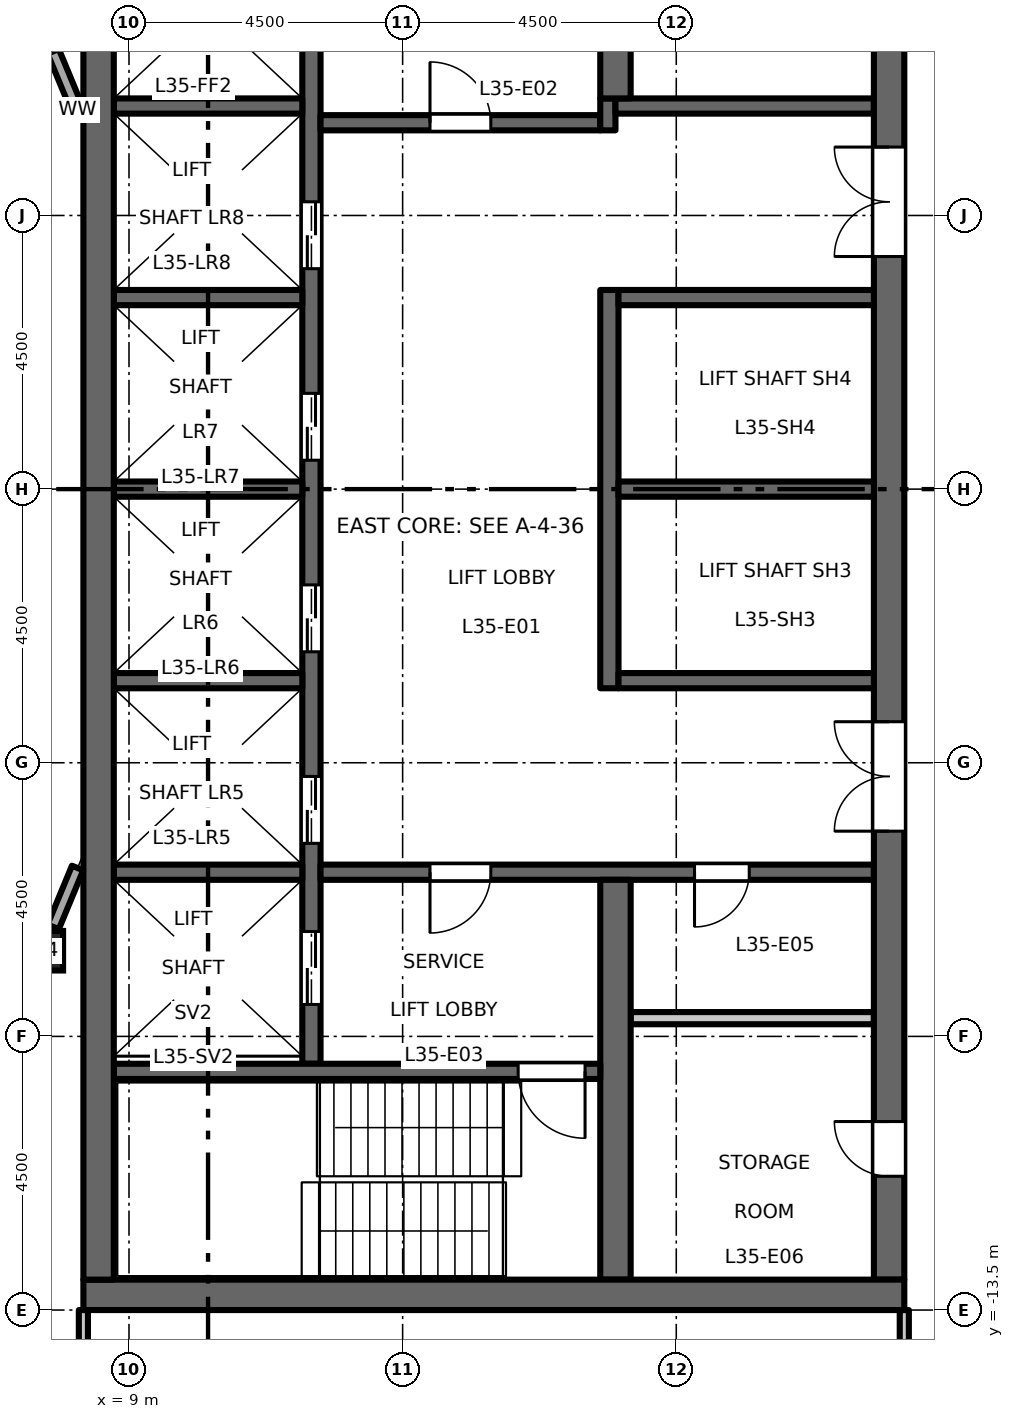
"""IFC4 building model, lengths in metres.
Left out: names, types, materials, properties, quantities, classifications, styles, units other than length and angle.
Written with IfcOpenShell. Run it as: python <this file> out.ifc"""

import sys

from ifc_helpers import new_model, si_unit, direction, frame, frame_2d, origin, origin_2d, place, context, subcontext, project, spatial, rectangle, hollow_rectangle, extrude, element, fill, save


model = new_model("IFC4")
c1 = context("Model", 3, precision=1e-05, world=origin(), true_north=direction((0.0, 1.0)))
c2 = subcontext(c1, "Body", "Model", "MODEL_VIEW")
j1 = project(units=[si_unit("LENGTHUNIT", "METRE"), si_unit("PLANEANGLEUNIT", "RADIAN")], contexts=[c1])
p1 = place(None, origin())
s1 = spatial("IfcSite", under=j1, at=p1, CompositionType="ELEMENT")
p2 = place(p1, origin())
s2 = spatial("IfcBuilding", under=s1, at=p2, CompositionType="ELEMENT")
p3 = place(p2, frame((0.0, 0.0, 163.2)))
s3 = spatial("IfcBuildingStorey", under=s2, at=p3, CompositionType="ELEMENT", Elevation=163.2)
p4 = place(p3, frame((7.591, -7.591, 0.0), z_axis=(0.0, 0.0, 1.0), x_axis=(1.0, 0.0, 0.0)))
e1 = element("IfcColumn", 1, at=p4, inside=s3, PredefinedType="COLUMN", context=c2, shape_type="SweptSolid", body=[
    extrude(hollow_rectangle(XDim=0.65, YDim=0.65, WallThickness=0.036, at=origin_2d()), origin(), (0.0, 0.0, 1.0), 4.5),
])
p5 = place(p3, frame((12.0, -9.45, 0.0), z_axis=(0.0, 0.0, 1.0), x_axis=(0.0, 1.0, 0.0)))
e2 = element("IfcWall", 2, at=p5, inside=s3, PredefinedType="SHEAR", context=c2, shape_type="SweptSolid", body=[
    extrude(rectangle(XDim=18.9, YDim=0.3, at=frame_2d((9.45, 0.0))), origin(), (0.0, 0.0, 1.0), 4.35),
])
p6 = place(p5, frame((3.625, 0.0, 0.0)))
e3 = element("IfcOpeningElement", 3, at=p6, cuts=e2, PredefinedType="OPENING", context=c2, shape_type="SweptSolid", body=[
    extrude(rectangle(XDim=1.1, YDim=2.1, at=frame_2d((0.55, 1.05))), frame((0.0, 0.16, 0.0), z_axis=(0.0, -1.0, 0.0), x_axis=(1.0, 0.0, 0.0)), (0.0, 0.0, 1.0), 0.32),
])
p7 = place(p5, frame((6.775, 0.0, 0.0)))
e4 = element("IfcOpeningElement", 4, at=p7, cuts=e2, PredefinedType="OPENING", context=c2, shape_type="SweptSolid", body=[
    extrude(rectangle(XDim=1.1, YDim=2.1, at=frame_2d((0.55, 1.05))), frame((0.0, 0.16, 0.0), z_axis=(0.0, -1.0, 0.0), x_axis=(1.0, 0.0, 0.0)), (0.0, 0.0, 1.0), 0.32),
])
p8 = place(p5, frame((9.925, 0.0, 0.0)))
e5 = element("IfcOpeningElement", 5, at=p8, cuts=e2, PredefinedType="OPENING", context=c2, shape_type="SweptSolid", body=[
    extrude(rectangle(XDim=1.1, YDim=2.1, at=frame_2d((0.55, 1.05))), frame((0.0, 0.16, 0.0), z_axis=(0.0, -1.0, 0.0), x_axis=(1.0, 0.0, 0.0)), (0.0, 0.0, 1.0), 0.32),
])
p9 = place(p5, frame((13.075, 0.0, 0.0)))
e6 = element("IfcOpeningElement", 6, at=p9, cuts=e2, PredefinedType="OPENING", context=c2, shape_type="SweptSolid", body=[
    extrude(rectangle(XDim=1.1, YDim=2.1, at=frame_2d((0.55, 1.05))), frame((0.0, 0.16, 0.0), z_axis=(0.0, -1.0, 0.0), x_axis=(1.0, 0.0, 0.0)), (0.0, 0.0, 1.0), 0.32),
])
p10 = place(p5, frame((16.725, 0.0, 0.0)))
e7 = element("IfcOpeningElement", 7, at=p10, cuts=e2, PredefinedType="OPENING", context=c2, shape_type="SweptSolid", body=[
    extrude(rectangle(XDim=1.2, YDim=2.1, at=frame_2d((0.6, 1.05))), frame((0.0, 0.16, 0.0), z_axis=(0.0, -1.0, 0.0), x_axis=(1.0, 0.0, 0.0)), (0.0, 0.0, 1.0), 0.32),
])
p11 = place(p5, frame((0.975, 0.0, 0.0)))
e8 = element("IfcOpeningElement", 8, at=p11, cuts=e2, PredefinedType="OPENING", context=c2, shape_type="SweptSolid", body=[
    extrude(rectangle(XDim=1.2, YDim=2.1, at=frame_2d((0.6, 1.05))), frame((0.0, 0.16, 0.0), z_axis=(0.0, -1.0, 0.0), x_axis=(1.0, 0.0, 0.0)), (0.0, 0.0, 1.0), 0.32),
])
p12 = place(p3, frame((12.15, 6.025, 0.0), z_axis=(0.0, 0.0, 1.0), x_axis=(1.0, 0.0, 0.0)))
e9 = element("IfcWall", 9, at=p12, inside=s3, PredefinedType="SHEAR", context=c2, shape_type="SweptSolid", body=[
    extrude(rectangle(XDim=4.6, YDim=0.25, at=frame_2d((2.3, 0.0))), origin(), (0.0, 0.0, 1.0), 4.35),
])
p13 = place(p12, frame((1.8, 0.0, 0.0)))
e10 = element("IfcOpeningElement", 10, at=p13, cuts=e9, PredefinedType="OPENING", context=c2, shape_type="SweptSolid", body=[
    extrude(rectangle(XDim=1.0, YDim=2.1, at=frame_2d((0.5, 1.05))), frame((0.0, 0.135, 0.0), z_axis=(0.0, -1.0, 0.0), x_axis=(1.0, 0.0, 0.0)), (0.0, 0.0, 1.0), 0.27),
])
p14 = place(p3, frame((16.875, 5.9, 0.0), z_axis=(0.0, 0.0, 1.0), x_axis=(0.0, 1.0, 0.0)))
e11 = element("IfcWall", 11, at=p14, inside=s3, PredefinedType="SHEAR", context=c2, shape_type="SweptSolid", body=[
    extrude(rectangle(XDim=0.525, YDim=0.25, at=frame_2d((0.263, 0.0))), origin(), (0.0, 0.0, 1.0), 4.35),
])
p15 = place(p3, frame((17.0, 6.3, 0.0), z_axis=(0.0, 0.0, 1.0), x_axis=(1.0, 0.0, 0.0)))
e12 = element("IfcWall", 12, at=p15, inside=s3, PredefinedType="SHEAR", context=c2, shape_type="SweptSolid", body=[
    extrude(rectangle(XDim=4.25, YDim=0.25, at=frame_2d((2.125, 0.0))), origin(), (0.0, 0.0, 1.0), 4.35),
])
p16 = place(p3, frame((12.15, -6.3, 0.0), z_axis=(0.0, 0.0, 1.0), x_axis=(1.0, 0.0, 0.0)))
e13 = element("IfcWall", 13, at=p16, inside=s3, PredefinedType="SHEAR", context=c2, shape_type="SweptSolid", body=[
    extrude(rectangle(XDim=9.1, YDim=0.25, at=frame_2d((4.55, 0.0))), origin(), (0.0, 0.0, 1.0), 4.35),
])
p17 = place(p16, frame((1.8, 0.0, 0.0)))
e14 = element("IfcOpeningElement", 14, at=p17, cuts=e13, PredefinedType="OPENING", context=c2, shape_type="SweptSolid", body=[
    extrude(rectangle(XDim=1.0, YDim=2.1, at=frame_2d((0.5, 1.05))), frame((0.0, 0.135, 0.0), z_axis=(0.0, -1.0, 0.0), x_axis=(1.0, 0.0, 0.0)), (0.0, 0.0, 1.0), 0.27),
])
p18 = place(p16, frame((6.15, 0.0, 0.0)))
e15 = element("IfcOpeningElement", 15, at=p18, cuts=e13, PredefinedType="OPENING", context=c2, shape_type="SweptSolid", body=[
    extrude(rectangle(XDim=0.9, YDim=2.1, at=frame_2d((0.45, 1.05))), frame((0.0, 0.135, 0.0), z_axis=(0.0, -1.0, 0.0), x_axis=(1.0, 0.0, 0.0)), (0.0, 0.0, 1.0), 0.27),
])
p19 = place(p3, frame((21.5, -13.0, 0.0), z_axis=(0.0, 0.0, 1.0), x_axis=(0.0, 1.0, 0.0)))
e16 = element("IfcWall", 16, at=p19, inside=s3, PredefinedType="SHEAR", context=c2, shape_type="SweptSolid", body=[
    extrude(rectangle(XDim=26.0, YDim=0.5, at=frame_2d((13.0, 0.0))), origin(), (0.0, 0.0, 1.0), 4.35),
])
p20 = place(p19, frame((16.825, 0.0, 0.0)))
e17 = element("IfcOpeningElement", 17, at=p20, cuts=e16, PredefinedType="OPENING", context=c2, shape_type="SweptSolid", body=[
    extrude(rectangle(XDim=1.8, YDim=2.1, at=frame_2d((0.9, 1.05))), frame((0.0, 0.26, 0.0), z_axis=(0.0, -1.0, 0.0), x_axis=(1.0, 0.0, 0.0)), (0.0, 0.0, 1.0), 0.52),
])
p21 = place(p19, frame((7.375, 0.0, 0.0)))
e18 = element("IfcOpeningElement", 18, at=p21, cuts=e16, PredefinedType="OPENING", context=c2, shape_type="SweptSolid", body=[
    extrude(rectangle(XDim=1.8, YDim=2.1, at=frame_2d((0.9, 1.05))), frame((0.0, 0.26, 0.0), z_axis=(0.0, -1.0, 0.0), x_axis=(1.0, 0.0, 0.0)), (0.0, 0.0, 1.0), 0.52),
])
p22 = place(p19, frame((22.45, 0.0, 0.0)))
e19 = element("IfcOpeningElement", 19, at=p22, cuts=e16, PredefinedType="OPENING", context=c2, shape_type="SweptSolid", body=[
    extrude(rectangle(XDim=0.9, YDim=2.1, at=frame_2d((0.45, 1.05))), frame((0.0, 0.26, 0.0), z_axis=(0.0, -1.0, 0.0), x_axis=(1.0, 0.0, 0.0)), (0.0, 0.0, 1.0), 0.52),
])
p23 = place(p19, frame((1.7, 0.0, 0.0)))
e20 = element("IfcOpeningElement", 20, at=p23, cuts=e16, PredefinedType="OPENING", context=c2, shape_type="SweptSolid", body=[
    extrude(rectangle(XDim=0.9, YDim=2.1, at=frame_2d((0.45, 1.05))), frame((0.0, 0.26, 0.0), z_axis=(0.0, -1.0, 0.0), x_axis=(1.0, 0.0, 0.0)), (0.0, 0.0, 1.0), 0.52),
])
p24 = place(p3, frame((17.25, -8.7, 0.0), z_axis=(0.0, 0.0, 1.0), x_axis=(1.0, 0.0, 0.0)))
e21 = element("IfcWall", 21, at=p24, inside=s3, PredefinedType="PARTITIONING", context=c2, shape_type="SweptSolid", body=[
    extrude(rectangle(XDim=4.0, YDim=0.2, at=frame_2d((2.0, 0.0))), origin(), (0.0, 0.0, 1.0), 4.35),
])
p25 = place(p3, frame((16.9, -3.275, 0.0), z_axis=(0.0, 0.0, 1.0), x_axis=(0.0, 1.0, 0.0)))
e22 = element("IfcWall", 22, at=p25, inside=s3, PredefinedType="SHEAR", context=c2, shape_type="SweptSolid", body=[
    extrude(rectangle(XDim=6.55, YDim=0.3, at=frame_2d((3.275, 0.0))), origin(), (0.0, 0.0, 1.0), 4.35),
])
for number, where, z_axis, x_axis in (
    (23, (17.05, 0.0, 0.0), (0.0, 0.0, 1.0), (1.0, 0.0, 0.0)),
    (24, (17.05, 3.15, 0.0), (0.0, 0.0, 1.0), (1.0, 0.0, 0.0)),
    (25, (17.05, -3.15, 0.0), (0.0, 0.0, 1.0), (1.0, 0.0, 0.0)),
):
    element("IfcWall", number, at=place(p3, frame(where, z_axis=z_axis, x_axis=x_axis)), inside=s3, PredefinedType="SHEAR", context=c2, shape_type="SweptSolid", body=[
        extrude(rectangle(XDim=4.2, YDim=0.25, at=frame_2d((2.1, 0.0))), origin(), (0.0, 0.0, 1.0), 4.35),
    ])
for number, where, z_axis, x_axis in (
    (26, (17.0, 6.425, 0.0), (0.0, 0.0, 1.0), (0.0, 1.0, 0.0)),
    (27, (17.0, -13.0, 0.0), (0.0, 0.0, 1.0), (0.0, 1.0, 0.0)),
):
    element("IfcWall", number, at=place(p3, frame(where, z_axis=z_axis, x_axis=x_axis)), inside=s3, PredefinedType="SHEAR", context=c2, shape_type="SweptSolid", body=[
        extrude(rectangle(XDim=6.575, YDim=0.5, at=frame_2d((3.288, 0.0))), origin(), (0.0, 0.0, 1.0), 4.35),
    ])
for number, where, z_axis, x_axis in (
    (28, (8.75, 0.0, 0.0), (0.0, 0.0, 1.0), (1.0, 0.0, 0.0)),
    (29, (8.75, 3.15, 0.0), (0.0, 0.0, 1.0), (1.0, 0.0, 0.0)),
    (30, (8.75, 6.3, 0.0), (0.0, 0.0, 1.0), (1.0, 0.0, 0.0)),
    (31, (8.75, -3.15, 0.0), (0.0, 0.0, 1.0), (1.0, 0.0, 0.0)),
    (32, (8.75, -6.3, 0.0), (0.0, 0.0, 1.0), (1.0, 0.0, 0.0)),
):
    element("IfcWall", number, at=place(p3, frame(where, z_axis=z_axis, x_axis=x_axis)), inside=s3, PredefinedType="SHEAR", context=c2, shape_type="SweptSolid", body=[
        extrude(rectangle(XDim=3.1, YDim=0.25, at=frame_2d((1.55, 0.0))), origin(), (0.0, 0.0, 1.0), 4.35),
    ])
p26 = place(p3, frame((8.75, -9.575, 0.0), z_axis=(0.0, 0.0, 1.0), x_axis=(1.0, 0.0, 0.0)))
e33 = element("IfcWall", 33, at=p26, inside=s3, PredefinedType="SHEAR", context=c2, shape_type="SweptSolid", body=[
    extrude(rectangle(XDim=8.0, YDim=0.25, at=frame_2d((4.0, 0.0))), origin(), (0.0, 0.0, 1.0), 4.35),
])
p27 = place(p26, frame((6.65, 0.0, 0.0)))
e34 = element("IfcOpeningElement", 34, at=p27, cuts=e33, PredefinedType="OPENING", context=c2, shape_type="SweptSolid", body=[
    extrude(rectangle(XDim=1.1, YDim=2.1, at=frame_2d((0.55, 1.05))), frame((0.0, 0.135, 0.0), z_axis=(0.0, -1.0, 0.0), x_axis=(1.0, 0.0, 0.0)), (0.0, 0.0, 1.0), 0.27),
])
p28 = place(p3, frame((8.25, -13.25, 0.0), z_axis=(0.0, 0.0, 1.0), x_axis=(1.0, 0.0, 0.0)))
e35 = element("IfcWall", 35, at=p28, inside=s3, PredefinedType="SHEAR", context=c2, shape_type="SweptSolid", body=[
    extrude(rectangle(XDim=13.5, YDim=0.5, at=frame_2d((6.75, 0.0))), origin(), (0.0, 0.0, 1.0), 4.35),
])
p29 = place(p3, frame((8.5, -13.0, 0.0), z_axis=(0.0, 0.0, 1.0), x_axis=(0.0, 1.0, 0.0)))
e36 = element("IfcWall", 36, at=p29, inside=s3, PredefinedType="SHEAR", context=c2, shape_type="SweptSolid", body=[
    extrude(rectangle(XDim=26.0, YDim=0.5, at=frame_2d((13.0, 0.0))), origin(), (0.0, 0.0, 1.0), 4.35),
])
for number, where, z_axis, x_axis in (
    (37, (7.753, -7.199, 0.0), (0.0, 0.0, 1.0), (0.383, 0.924, 0.0)),
    (38, (8.154, 6.231, 0.0), (0.0, 0.0, 1.0), (-0.383, 0.924, 0.0)),
):
    element("IfcWall", number, at=place(p3, frame(where, z_axis=z_axis, x_axis=x_axis)), inside=s3, PredefinedType="STANDARD", context=c2, shape_type="SweptSolid", body=[
        extrude(rectangle(XDim=1.048, YDim=0.2, at=frame_2d((0.524, 0.0))), origin(), (0.0, 0.0, 1.0), 3.826),
    ])
p30 = place(p3, frame((8.25, -15.8, 0.0), z_axis=(0.0, 0.0, 1.0), x_axis=(0.0, 1.0, 0.0)))
e39 = element("IfcWall", 39, at=p30, inside=s3, PredefinedType="PARTITIONING", context=c2, shape_type="SweptSolid", body=[
    extrude(rectangle(XDim=2.3, YDim=0.15, at=frame_2d((1.15, 0.0))), origin(), (0.0, 0.0, 1.0), 4.35),
])
p31 = place(p3, frame((21.75, -17.925, 0.0), z_axis=(0.0, 0.0, 1.0), x_axis=(0.0, 1.0, 0.0)))
e40 = element("IfcWall", 40, at=p31, inside=s3, PredefinedType="PARTITIONING", context=c2, shape_type="SweptSolid", body=[
    extrude(rectangle(XDim=4.425, YDim=0.15, at=frame_2d((2.212, 0.0))), origin(), (0.0, 0.0, 1.0), 4.35),
])
p32 = place(p13, origin())
e41 = element("IfcDoor", 41, at=p32, inside=s3, OperationType="SINGLE_SWING_RIGHT", PredefinedType="DOOR", context=c2, shape_type="SweptSolid", body=[
    extrude(rectangle(XDim=1.0, YDim=2.1, at=frame_2d((0.5, 1.05))), frame((0.0, 0.025, 0.0), z_axis=(0.0, -1.0, 0.0), x_axis=(1.0, 0.0, 0.0)), (0.0, 0.0, 1.0), 0.05),
])
fill(e10, e41)
p33 = place(p17, origin())
e42 = element("IfcDoor", 42, at=p33, inside=s3, OperationType="SINGLE_SWING_LEFT", PredefinedType="DOOR", context=c2, shape_type="SweptSolid", body=[
    extrude(rectangle(XDim=1.0, YDim=2.1, at=frame_2d((0.5, 1.05))), frame((0.0, 0.025, 0.0), z_axis=(0.0, -1.0, 0.0), x_axis=(1.0, 0.0, 0.0)), (0.0, 0.0, 1.0), 0.05),
])
fill(e14, e42)
p34 = place(p27, origin())
e43 = element("IfcDoor", 43, at=p34, inside=s3, OperationType="SINGLE_SWING_RIGHT", PredefinedType="DOOR", context=c2, shape_type="SweptSolid", body=[
    extrude(rectangle(XDim=1.1, YDim=2.1, at=frame_2d((0.55, 1.05))), frame((0.0, 0.025, 0.0), z_axis=(0.0, -1.0, 0.0), x_axis=(1.0, 0.0, 0.0)), (0.0, 0.0, 1.0), 0.05),
])
fill(e34, e43)
p35 = place(p20, origin())
e44 = element("IfcDoor", 44, at=p35, inside=s3, OperationType="DOUBLE_DOOR_DOUBLE_SWING", PredefinedType="DOOR", context=c2, shape_type="SweptSolid", body=[
    extrude(rectangle(XDim=1.8, YDim=2.1, at=frame_2d((0.9, 1.05))), frame((0.0, 0.025, 0.0), z_axis=(0.0, -1.0, 0.0), x_axis=(1.0, 0.0, 0.0)), (0.0, 0.0, 1.0), 0.05),
])
fill(e17, e44)
p36 = place(p21, origin())
e45 = element("IfcDoor", 45, at=p36, inside=s3, OperationType="DOUBLE_DOOR_DOUBLE_SWING", PredefinedType="DOOR", context=c2, shape_type="SweptSolid", body=[
    extrude(rectangle(XDim=1.8, YDim=2.1, at=frame_2d((0.9, 1.05))), frame((0.0, 0.025, 0.0), z_axis=(0.0, -1.0, 0.0), x_axis=(1.0, 0.0, 0.0)), (0.0, 0.0, 1.0), 0.05),
])
fill(e18, e45)
p37 = place(p6, origin())
e46 = element("IfcDoor", 46, at=p37, inside=s3, OperationType="DOUBLE_DOOR_SLIDING", PredefinedType="DOOR", context=c2, shape_type="SweptSolid", body=[
    extrude(rectangle(XDim=1.1, YDim=2.1, at=frame_2d((0.55, 1.05))), frame((0.0, 0.025, 0.0), z_axis=(0.0, -1.0, 0.0), x_axis=(1.0, 0.0, 0.0)), (0.0, 0.0, 1.0), 0.05),
])
fill(e3, e46)
p38 = place(p7, origin())
e47 = element("IfcDoor", 47, at=p38, inside=s3, OperationType="DOUBLE_DOOR_SLIDING", PredefinedType="DOOR", context=c2, shape_type="SweptSolid", body=[
    extrude(rectangle(XDim=1.1, YDim=2.1, at=frame_2d((0.55, 1.05))), frame((0.0, 0.025, 0.0), z_axis=(0.0, -1.0, 0.0), x_axis=(1.0, 0.0, 0.0)), (0.0, 0.0, 1.0), 0.05),
])
fill(e4, e47)
p39 = place(p8, origin())
e48 = element("IfcDoor", 48, at=p39, inside=s3, OperationType="DOUBLE_DOOR_SLIDING", PredefinedType="DOOR", context=c2, shape_type="SweptSolid", body=[
    extrude(rectangle(XDim=1.1, YDim=2.1, at=frame_2d((0.55, 1.05))), frame((0.0, 0.025, 0.0), z_axis=(0.0, -1.0, 0.0), x_axis=(1.0, 0.0, 0.0)), (0.0, 0.0, 1.0), 0.05),
])
fill(e5, e48)
p40 = place(p9, origin())
e49 = element("IfcDoor", 49, at=p40, inside=s3, OperationType="DOUBLE_DOOR_SLIDING", PredefinedType="DOOR", context=c2, shape_type="SweptSolid", body=[
    extrude(rectangle(XDim=1.1, YDim=2.1, at=frame_2d((0.55, 1.05))), frame((0.0, 0.025, 0.0), z_axis=(0.0, -1.0, 0.0), x_axis=(1.0, 0.0, 0.0)), (0.0, 0.0, 1.0), 0.05),
])
fill(e6, e49)
p41 = place(p11, origin())
e50 = element("IfcDoor", 50, at=p41, inside=s3, OperationType="DOUBLE_DOOR_SLIDING", PredefinedType="DOOR", context=c2, shape_type="SweptSolid", body=[
    extrude(rectangle(XDim=1.2, YDim=2.1, at=frame_2d((0.6, 1.05))), frame((0.0, 0.025, 0.0), z_axis=(0.0, -1.0, 0.0), x_axis=(1.0, 0.0, 0.0)), (0.0, 0.0, 1.0), 0.05),
])
fill(e8, e50)
p42 = place(p18, origin())
e51 = element("IfcDoor", 51, at=p42, inside=s3, OperationType="SINGLE_SWING_LEFT", PredefinedType="DOOR", context=c2, shape_type="SweptSolid", body=[
    extrude(rectangle(XDim=0.9, YDim=2.1, at=frame_2d((0.45, 1.05))), frame((0.0, 0.025, 0.0), z_axis=(0.0, -1.0, 0.0), x_axis=(1.0, 0.0, 0.0)), (0.0, 0.0, 1.0), 0.05),
])
fill(e15, e51)
p43 = place(p23, origin())
e52 = element("IfcDoor", 52, at=p43, inside=s3, OperationType="SINGLE_SWING_LEFT", PredefinedType="DOOR", context=c2, shape_type="SweptSolid", body=[
    extrude(rectangle(XDim=0.9, YDim=2.1, at=frame_2d((0.45, 1.05))), frame((0.0, 0.025, 0.0), z_axis=(0.0, -1.0, 0.0), x_axis=(1.0, 0.0, 0.0)), (0.0, 0.0, 1.0), 0.05),
])
fill(e20, e52)
save(model, sys.argv[1])
